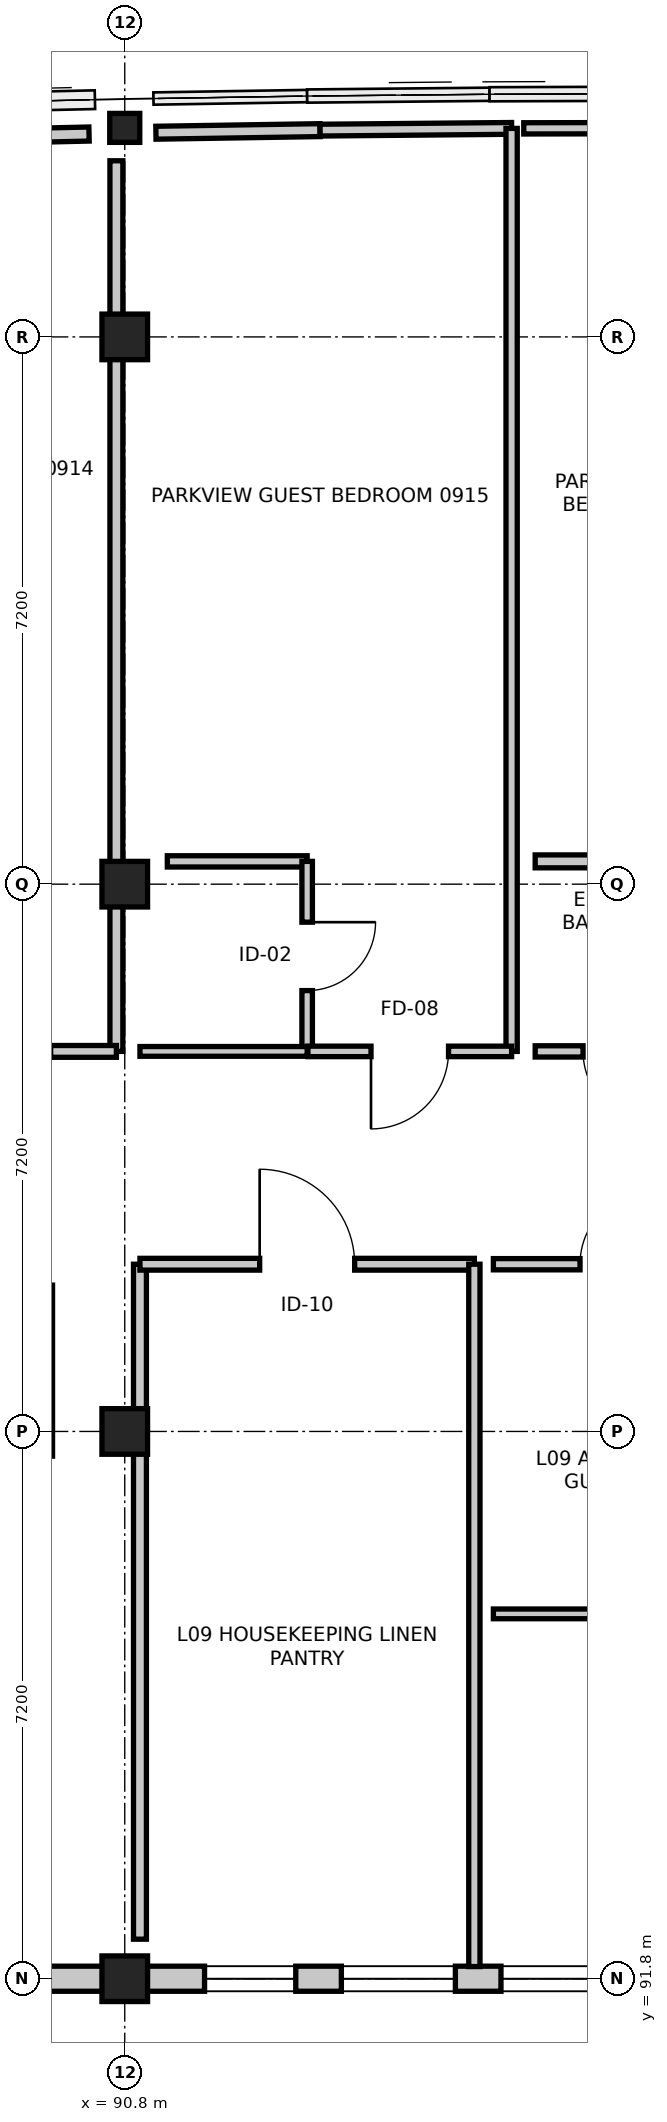
"""IFC4 building model, lengths in metres.
Left out: names, types, materials, properties, quantities, classifications, styles, units other than length and angle.
Written with IfcOpenShell. Run it as: python <this file> out.ifc"""

import sys

from ifc_helpers import new_model, si_unit, direction, frame, frame_2d, origin, origin_2d, place, context, subcontext, project, spatial, rectangle, i_section, extrude, element, fill, save


model = new_model("IFC4")
c1 = context("Model", 3, precision=1e-05, world=origin(), true_north=direction((0.0, 1.0)))
c2 = subcontext(c1, "Body", "Model", "MODEL_VIEW")
j1 = project(units=[si_unit("LENGTHUNIT", "METRE"), si_unit("PLANEANGLEUNIT", "RADIAN")], contexts=[c1])
p1 = place(None, origin())
s1 = spatial("IfcSite", under=j1, at=p1, CompositionType="ELEMENT")
p2 = place(p1, origin())
s2 = spatial("IfcBuilding", under=s1, at=p2, CompositionType="ELEMENT")
p3 = place(p2, frame((0.0, 0.0, 37.2)))
s3 = spatial("IfcBuildingStorey", under=s2, at=p3, CompositionType="ELEMENT", Elevation=37.2)
for number, where, z_axis, x_axis in (
    (1, (90.8, 91.8, 0.0), (0.0, 0.0, 1.0), (1.0, 0.0, 0.0)),
    (2, (90.8, 99.0, 0.0), (0.0, 0.0, 1.0), (1.0, 0.0, 0.0)),
    (3, (90.8, 106.2, 0.0), (0.0, 0.0, 1.0), (1.0, 0.0, 0.0)),
    (4, (90.8, 113.4, 0.0), (0.0, 0.0, 1.0), (1.0, 0.0, 0.0)),
):
    element("IfcColumn", number, at=place(p3, frame(where, z_axis=z_axis, x_axis=x_axis)), inside=s3, PredefinedType="COLUMN", context=c2, shape_type="SweptSolid", body=[
        extrude(rectangle(XDim=0.6, YDim=0.6, at=origin_2d()), origin(), (0.0, 0.0, 1.0), 3.6),
    ])
p4 = place(p3, frame((90.8, 116.15, 0.0), z_axis=(0.0, 0.0, 1.0), x_axis=(1.0, 0.0, 0.0)))
e5 = element("IfcColumn", 5, at=p4, inside=s3, PredefinedType="COLUMN", context=c2, shape_type="SweptSolid", body=[
    extrude(i_section(OverallWidth=0.395, OverallDepth=0.381, WebThickness=0.018, FlangeThickness=0.03, FilletRadius=0.015, at=origin_2d()), origin(), (0.0, 0.0, 1.0), 3.6),
])
p5 = place(p3, frame((98.0, 91.8, 0.0), z_axis=(0.0, 0.0, 1.0), x_axis=(-1.0, 0.0, 0.0)))
e6 = element("IfcWall", 6, at=p5, inside=s3, PredefinedType="STANDARD", context=c2, shape_type="SweptSolid", body=[
    extrude(rectangle(XDim=7.2, YDim=0.33, at=frame_2d((3.6, 0.0))), origin(), (0.0, 0.0, 1.0), 2.765),
])
p6 = place(p5, frame((2.85, 0.0, 0.75)))
e7 = element("IfcOpeningElement", 7, at=p6, cuts=e6, PredefinedType="OPENING", context=c2, shape_type="SweptSolid", body=[
    extrude(rectangle(XDim=1.5, YDim=1.5, at=frame_2d((0.75, 0.75))), frame((0.0, 0.175, 0.0), z_axis=(0.0, -1.0, 0.0), x_axis=(1.0, 0.0, 0.0)), (0.0, 0.0, 1.0), 0.35),
])
p7 = place(p5, frame((1.05, 0.0, 0.85)))
e8 = element("IfcOpeningElement", 8, at=p7, cuts=e6, PredefinedType="OPENING", context=c2, shape_type="SweptSolid", body=[
    extrude(rectangle(XDim=1.2, YDim=1.8, at=frame_2d((0.6, 0.9))), frame((0.0, 0.175, 0.0), z_axis=(0.0, -1.0, 0.0), x_axis=(1.0, 0.0, 0.0)), (0.0, 0.0, 1.0), 0.35),
])
p8 = place(p5, frame((4.95, 0.0, 0.85)))
e9 = element("IfcOpeningElement", 9, at=p8, cuts=e6, PredefinedType="OPENING", context=c2, shape_type="SweptSolid", body=[
    extrude(rectangle(XDim=1.2, YDim=1.8, at=frame_2d((0.6, 0.9))), frame((0.0, 0.175, 0.0), z_axis=(0.0, -1.0, 0.0), x_axis=(1.0, 0.0, 0.0)), (0.0, 0.0, 1.0), 0.35),
])
p9 = place(p3, frame((90.8, 91.8, 0.0), z_axis=(0.0, 0.0, 1.0), x_axis=(-1.0, 0.0, 0.0)))
e10 = element("IfcWall", 10, at=p9, inside=s3, PredefinedType="STANDARD", context=c2, shape_type="SweptSolid", body=[
    extrude(rectangle(XDim=7.2, YDim=0.33, at=frame_2d((3.6, 0.0))), origin(), (0.0, 0.0, 1.0), 2.765),
])
p10 = place(p9, frame((2.85, 0.0, 0.75)))
e11 = element("IfcOpeningElement", 11, at=p10, cuts=e10, PredefinedType="OPENING", context=c2, shape_type="SweptSolid", body=[
    extrude(rectangle(XDim=1.5, YDim=1.5, at=frame_2d((0.75, 0.75))), frame((0.0, 0.175, 0.0), z_axis=(0.0, -1.0, 0.0), x_axis=(1.0, 0.0, 0.0)), (0.0, 0.0, 1.0), 0.35),
])
p11 = place(p9, frame((1.05, 0.0, 0.85)))
e12 = element("IfcOpeningElement", 12, at=p11, cuts=e10, PredefinedType="OPENING", context=c2, shape_type="SweptSolid", body=[
    extrude(rectangle(XDim=1.2, YDim=1.8, at=frame_2d((0.6, 0.9))), frame((0.0, 0.175, 0.0), z_axis=(0.0, -1.0, 0.0), x_axis=(1.0, 0.0, 0.0)), (0.0, 0.0, 1.0), 0.35),
])
p12 = place(p9, frame((4.95, 0.0, 0.85)))
e13 = element("IfcOpeningElement", 13, at=p12, cuts=e10, PredefinedType="OPENING", context=c2, shape_type="SweptSolid", body=[
    extrude(rectangle(XDim=1.2, YDim=1.8, at=frame_2d((0.6, 0.9))), frame((0.0, 0.175, 0.0), z_axis=(0.0, -1.0, 0.0), x_axis=(1.0, 0.0, 0.0)), (0.0, 0.0, 1.0), 0.35),
])
p13 = place(p3, frame((91.0, 92.32, 0.0), z_axis=(0.0, 0.0, 1.0), x_axis=(0.0, 1.0, 0.0)))
e14 = element("IfcWall", 14, at=p13, inside=s3, PredefinedType="PARTITIONING", context=c2, shape_type="SweptSolid", body=[
    extrude(rectangle(XDim=8.88, YDim=0.17, at=frame_2d((4.44, 0.0))), origin(), (0.0, 0.0, 1.0), 2.715),
])
p14 = place(p3, frame((91.0, 101.2, 0.0), z_axis=(0.0, 0.0, 1.0), x_axis=(1.0, 0.0, 0.0)))
e15 = element("IfcWall", 15, at=p14, inside=s3, PredefinedType="PARTITIONING", context=c2, shape_type="SweptSolid", body=[
    extrude(rectangle(XDim=4.4, YDim=0.155, at=frame_2d((2.2, 0.0))), origin(), (0.0, 0.0, 1.0), 2.715),
])
p15 = place(p14, frame((1.575, 0.0, 0.0)))
e16 = element("IfcOpeningElement", 16, at=p15, cuts=e15, PredefinedType="OPENING", context=c2, shape_type="SweptSolid", body=[
    extrude(rectangle(XDim=1.25, YDim=2.2, at=frame_2d((0.625, 1.1))), frame((0.0, 0.087, 0.0), z_axis=(0.0, -1.0, 0.0), x_axis=(1.0, 0.0, 0.0)), (0.0, 0.0, 1.0), 0.175),
])
p16 = place(p3, frame((95.4, 101.2, 0.0), z_axis=(0.0, 0.0, 1.0), x_axis=(0.0, -1.0, 0.0)))
e17 = element("IfcWall", 17, at=p16, inside=s3, PredefinedType="PARTITIONING", context=c2, shape_type="SweptSolid", body=[
    extrude(rectangle(XDim=9.24, YDim=0.148, at=frame_2d((4.62, 0.0))), origin(), (0.0, 0.0, 1.0), 2.765),
])
p17 = place(p3, frame((95.65, 101.2, 0.0), z_axis=(0.0, 0.0, 1.0), x_axis=(1.0, 0.0, 0.0)))
e18 = element("IfcWall", 18, at=p17, inside=s3, PredefinedType="PARTITIONING", context=c2, shape_type="SweptSolid", body=[
    extrude(rectangle(XDim=3.25, YDim=0.148, at=frame_2d((1.625, 0.0))), origin(), (0.0, 0.0, 1.0), 2.715),
])
p18 = place(p17, frame((1.14, 0.0, 0.0)))
e19 = element("IfcOpeningElement", 19, at=p18, cuts=e18, PredefinedType="OPENING", context=c2, shape_type="SweptSolid", body=[
    extrude(rectangle(XDim=0.97, YDim=2.16, at=frame_2d((0.485, 1.08))), frame((0.0, 0.084, 0.0), z_axis=(0.0, -1.0, 0.0), x_axis=(1.0, 0.0, 0.0)), (0.0, 0.0, 1.0), 0.168),
])
p19 = place(p3, frame((98.9, 96.6, 0.0), z_axis=(0.0, 0.0, 1.0), x_axis=(-1.0, 0.0, 0.0)))
e20 = element("IfcWall", 20, at=p19, inside=s3, PredefinedType="PARTITIONING", context=c2, shape_type="SweptSolid", body=[
    extrude(rectangle(XDim=3.25, YDim=0.128, at=frame_2d((1.625, 0.0))), origin(), (0.0, 0.0, 1.0), 2.715),
])
p20 = place(p3, frame((88.17, 116.019, 0.0), z_axis=(0.0, 0.0, 1.0), x_axis=(0.999734315018, 0.023049932218, 0.0)))
e21 = element("IfcWall", 21, at=p20, inside=s3, PredefinedType="PARTITIONING", context=c2, shape_type="SweptSolid", body=[
    extrude(rectangle(XDim=2.161, YDim=0.185, at=frame_2d((1.08, 0.0))), origin(), (0.0, 0.0, 1.0), 2.956),
])
p21 = place(p3, frame((90.69, 115.717, 0.0), z_axis=(0.0, 0.0, 1.0), x_axis=(0.0, -1.0, 0.0)))
e22 = element("IfcWall", 22, at=p21, inside=s3, PredefinedType="PARTITIONING", context=c2, shape_type="SweptSolid", body=[
    extrude(rectangle(XDim=11.717, YDim=0.17, at=frame_2d((5.859, 0.0))), origin(), (0.0, 0.0, 1.0), 2.715),
])
p22 = place(p3, frame((90.69, 104.0, 0.0), z_axis=(0.0, 0.0, 1.0), x_axis=(-1.0, 0.0, 0.0)))
e23 = element("IfcWall", 23, at=p22, inside=s3, PredefinedType="PARTITIONING", context=c2, shape_type="SweptSolid", body=[
    extrude(rectangle(XDim=2.68, YDim=0.155, at=frame_2d((1.34, 0.0))), origin(), (0.0, 0.0, 1.0), 2.715),
])
p23 = place(p22, frame((0.865, 0.0, 0.0)))
e24 = element("IfcOpeningElement", 24, at=p23, cuts=e23, PredefinedType="OPENING", context=c2, shape_type="SweptSolid", body=[
    extrude(rectangle(XDim=0.95, YDim=2.1, at=frame_2d((0.475, 1.05))), frame((0.0, 0.087, 0.0), z_axis=(0.0, -1.0, 0.0), x_axis=(1.0, 0.0, 0.0)), (0.0, 0.0, 1.0), 0.175),
])
p24 = place(p3, frame((91.36, 106.5, 0.0), z_axis=(0.0, 0.0, 1.0), x_axis=(1.0, 0.0, 0.0)))
e25 = element("IfcWall", 25, at=p24, inside=s3, PredefinedType="PARTITIONING", context=c2, shape_type="SweptSolid", body=[
    extrude(rectangle(XDim=1.84, YDim=0.148, at=frame_2d((0.92, 0.0))), origin(), (0.0, 0.0, 1.0), 3.38),
])
p25 = place(p3, frame((93.2, 106.5, 0.0), z_axis=(0.0, 0.0, 1.0), x_axis=(0.0, -1.0, 0.0)))
e26 = element("IfcWall", 26, at=p25, inside=s3, PredefinedType="PARTITIONING", context=c2, shape_type="SweptSolid", body=[
    extrude(rectangle(XDim=2.5, YDim=0.138, at=frame_2d((1.25, 0.0))), origin(), (0.0, 0.0, 1.0), 2.765),
])
p26 = place(p25, frame((0.8, 0.0, 0.0)))
e27 = element("IfcOpeningElement", 27, at=p26, cuts=e26, PredefinedType="OPENING", context=c2, shape_type="SweptSolid", body=[
    extrude(rectangle(XDim=0.9, YDim=2.08, at=frame_2d((0.45, 1.04))), frame((0.0, 0.079, 0.0), z_axis=(0.0, -1.0, 0.0), x_axis=(1.0, 0.0, 0.0)), (0.0, 0.0, 1.0), 0.158),
])
p27 = place(p3, frame((93.2, 104.0, 0.0), z_axis=(0.0, 0.0, 1.0), x_axis=(-1.0, 0.0, 0.0)))
e28 = element("IfcWall", 28, at=p27, inside=s3, PredefinedType="PARTITIONING", context=c2, shape_type="SweptSolid", body=[
    extrude(rectangle(XDim=2.2, YDim=0.128, at=frame_2d((1.1, 0.0))), origin(), (0.0, 0.0, 1.0), 2.715),
])
p28 = place(p3, frame((91.21, 116.086, 0.0), z_axis=(0.0, 0.0, 1.0), x_axis=(0.999874843241, 0.015820804482, 0.0)))
e29 = element("IfcWall", 29, at=p28, inside=s3, PredefinedType="PARTITIONING", context=c2, shape_type="SweptSolid", body=[
    extrude(rectangle(XDim=2.16, YDim=0.17, at=frame_2d((1.08, 0.0))), origin(), (0.0, 0.0, 1.0), 2.956),
])
p29 = place(p3, frame((93.37, 116.12, 0.0), z_axis=(0.0, 0.0, 1.0), x_axis=(0.999959405621, 0.009010388986, 0.0)))
e30 = element("IfcWall", 30, at=p29, inside=s3, PredefinedType="PARTITIONING", context=c2, shape_type="SweptSolid", body=[
    extrude(rectangle(XDim=2.52, YDim=0.155, at=frame_2d((1.26, 0.0))), origin(), (0.0, 0.0, 1.0), 2.956),
])
p30 = place(p3, frame((95.89, 116.143, 0.0), z_axis=(0.0, 0.0, 1.0), x_axis=(0.0, -1.0, 0.0)))
e31 = element("IfcWall", 31, at=p30, inside=s3, PredefinedType="PARTITIONING", context=c2, shape_type="SweptSolid", body=[
    extrude(rectangle(XDim=12.143, YDim=0.148, at=frame_2d((6.072, 0.0))), origin(), (0.0, 0.0, 1.0), 2.765),
])
p31 = place(p3, frame((95.89, 104.0, 0.0), z_axis=(0.0, 0.0, 1.0), x_axis=(-1.0, 0.0, 0.0)))
e32 = element("IfcWall", 32, at=p31, inside=s3, PredefinedType="PARTITIONING", context=c2, shape_type="SweptSolid", body=[
    extrude(rectangle(XDim=2.68, YDim=0.138, at=frame_2d((1.34, 0.0))), origin(), (0.0, 0.0, 1.0), 3.38),
])
p32 = place(p31, frame((0.83, 0.0, 0.0)))
e33 = element("IfcOpeningElement", 33, at=p32, cuts=e32, PredefinedType="OPENING", context=c2, shape_type="SweptSolid", body=[
    extrude(rectangle(XDim=1.02, YDim=2.15, at=frame_2d((0.51, 1.075))), frame((0.0, 0.079, 0.0), z_axis=(0.0, -1.0, 0.0), x_axis=(1.0, 0.0, 0.0)), (0.0, 0.0, 1.0), 0.158),
])
p33 = place(p3, frame((96.2, 106.5, 0.0), z_axis=(0.0, 0.0, 1.0), x_axis=(1.0, 0.0, 0.0)))
e34 = element("IfcWall", 34, at=p33, inside=s3, PredefinedType="PARTITIONING", context=c2, shape_type="SweptSolid", body=[
    extrude(rectangle(XDim=2.2, YDim=0.17, at=frame_2d((1.1, 0.0))), origin(), (0.0, 0.0, 1.0), 2.715),
])
p34 = place(p3, frame((98.4, 104.0, 0.0), z_axis=(0.0, 0.0, 1.0), x_axis=(-1.0, 0.0, 0.0)))
e35 = element("IfcWall", 35, at=p34, inside=s3, PredefinedType="PARTITIONING", context=c2, shape_type="SweptSolid", body=[
    extrude(rectangle(XDim=2.2, YDim=0.148, at=frame_2d((1.1, 0.0))), origin(), (0.0, 0.0, 1.0), 2.715),
])
p35 = place(p34, frame((0.63, 0.0, 0.0)))
e36 = element("IfcOpeningElement", 36, at=p35, cuts=e35, PredefinedType="OPENING", context=c2, shape_type="SweptSolid", body=[
    extrude(rectangle(XDim=0.94, YDim=2.12, at=frame_2d((0.47, 1.06))), frame((0.0, 0.084, 0.0), z_axis=(0.0, -1.0, 0.0), x_axis=(1.0, 0.0, 0.0)), (0.0, 0.0, 1.0), 0.168),
])
p36 = place(p3, frame((96.05, 116.144, 0.0), z_axis=(0.0, 0.0, 1.0), x_axis=(0.999998305864, 0.001840725423, 0.0)))
e37 = element("IfcWall", 37, at=p36, inside=s3, PredefinedType="PARTITIONING", context=c2, shape_type="SweptSolid", body=[
    extrude(rectangle(XDim=2.52, YDim=0.148, at=frame_2d((1.26, 0.0))), origin(), (0.0, 0.0, 1.0), 2.956),
])
p37 = place(p6, origin())
e38 = element("IfcWindow", 38, at=p37, inside=s3, PartitioningType="SINGLE_PANEL", PredefinedType="WINDOW", context=c2, shape_type="SweptSolid", body=[
    extrude(rectangle(XDim=1.5, YDim=1.5, at=frame_2d((0.75, 0.75))), frame((0.0, 0.03, 0.0), z_axis=(0.0, -1.0, 0.0), x_axis=(1.0, 0.0, 0.0)), (0.0, 0.0, 1.0), 0.06),
])
fill(e7, e38)
p38 = place(p7, origin())
e39 = element("IfcWindow", 39, at=p38, inside=s3, PartitioningType="SINGLE_PANEL", PredefinedType="WINDOW", context=c2, shape_type="SweptSolid", body=[
    extrude(rectangle(XDim=1.2, YDim=1.8, at=frame_2d((0.6, 0.9))), frame((0.0, 0.03, 0.0), z_axis=(0.0, -1.0, 0.0), x_axis=(1.0, 0.0, 0.0)), (0.0, 0.0, 1.0), 0.06),
])
fill(e8, e39)
p39 = place(p8, origin())
e40 = element("IfcWindow", 40, at=p39, inside=s3, PartitioningType="SINGLE_PANEL", PredefinedType="WINDOW", context=c2, shape_type="SweptSolid", body=[
    extrude(rectangle(XDim=1.2, YDim=1.8, at=frame_2d((0.6, 0.9))), frame((0.0, 0.03, 0.0), z_axis=(0.0, -1.0, 0.0), x_axis=(1.0, 0.0, 0.0)), (0.0, 0.0, 1.0), 0.06),
])
fill(e9, e40)
p40 = place(p15, origin())
e41 = element("IfcDoor", 41, at=p40, inside=s3, OperationType="SINGLE_SWING_LEFT", PredefinedType="DOOR", context=c2, shape_type="SweptSolid", body=[
    extrude(rectangle(XDim=1.25, YDim=2.2, at=frame_2d((0.625, 1.1))), frame((0.0, 0.025, 0.0), z_axis=(0.0, -1.0, 0.0), x_axis=(1.0, 0.0, 0.0)), (0.0, 0.0, 1.0), 0.05),
])
fill(e16, e41)
p41 = place(p18, origin())
e42 = element("IfcDoor", 42, at=p41, inside=s3, OperationType="SINGLE_SWING_RIGHT", PredefinedType="DOOR", context=c2, shape_type="SweptSolid", body=[
    extrude(rectangle(XDim=0.97, YDim=2.16, at=frame_2d((0.485, 1.08))), frame((0.0, 0.025, 0.0), z_axis=(0.0, -1.0, 0.0), x_axis=(1.0, 0.0, 0.0)), (0.0, 0.0, 1.0), 0.05),
])
fill(e19, e42)
p42 = place(p26, origin())
e43 = element("IfcDoor", 43, at=p42, inside=s3, OperationType="SINGLE_SWING_LEFT", PredefinedType="DOOR", context=c2, shape_type="SweptSolid", body=[
    extrude(rectangle(XDim=0.9, YDim=2.08, at=frame_2d((0.45, 1.04))), frame((0.0, 0.025, 0.0), z_axis=(0.0, -1.0, 0.0), x_axis=(1.0, 0.0, 0.0)), (0.0, 0.0, 1.0), 0.05),
])
fill(e27, e43)
p43 = place(p32, origin())
e44 = element("IfcDoor", 44, at=p43, inside=s3, OperationType="SINGLE_SWING_RIGHT", PredefinedType="DOOR", context=c2, shape_type="SweptSolid", body=[
    extrude(rectangle(XDim=1.02, YDim=2.15, at=frame_2d((0.51, 1.075))), frame((0.0, 0.025, 0.0), z_axis=(0.0, -1.0, 0.0), x_axis=(1.0, 0.0, 0.0)), (0.0, 0.0, 1.0), 0.05),
])
fill(e33, e44)
p44 = place(p35, origin())
e45 = element("IfcDoor", 45, at=p44, inside=s3, OperationType="SINGLE_SWING_LEFT", PredefinedType="DOOR", context=c2, shape_type="SweptSolid", body=[
    extrude(rectangle(XDim=0.94, YDim=2.12, at=frame_2d((0.47, 1.06))), frame((0.0, 0.025, 0.0), z_axis=(0.0, -1.0, 0.0), x_axis=(1.0, 0.0, 0.0)), (0.0, 0.0, 1.0), 0.05),
])
fill(e36, e45)
save(model, sys.argv[1])
